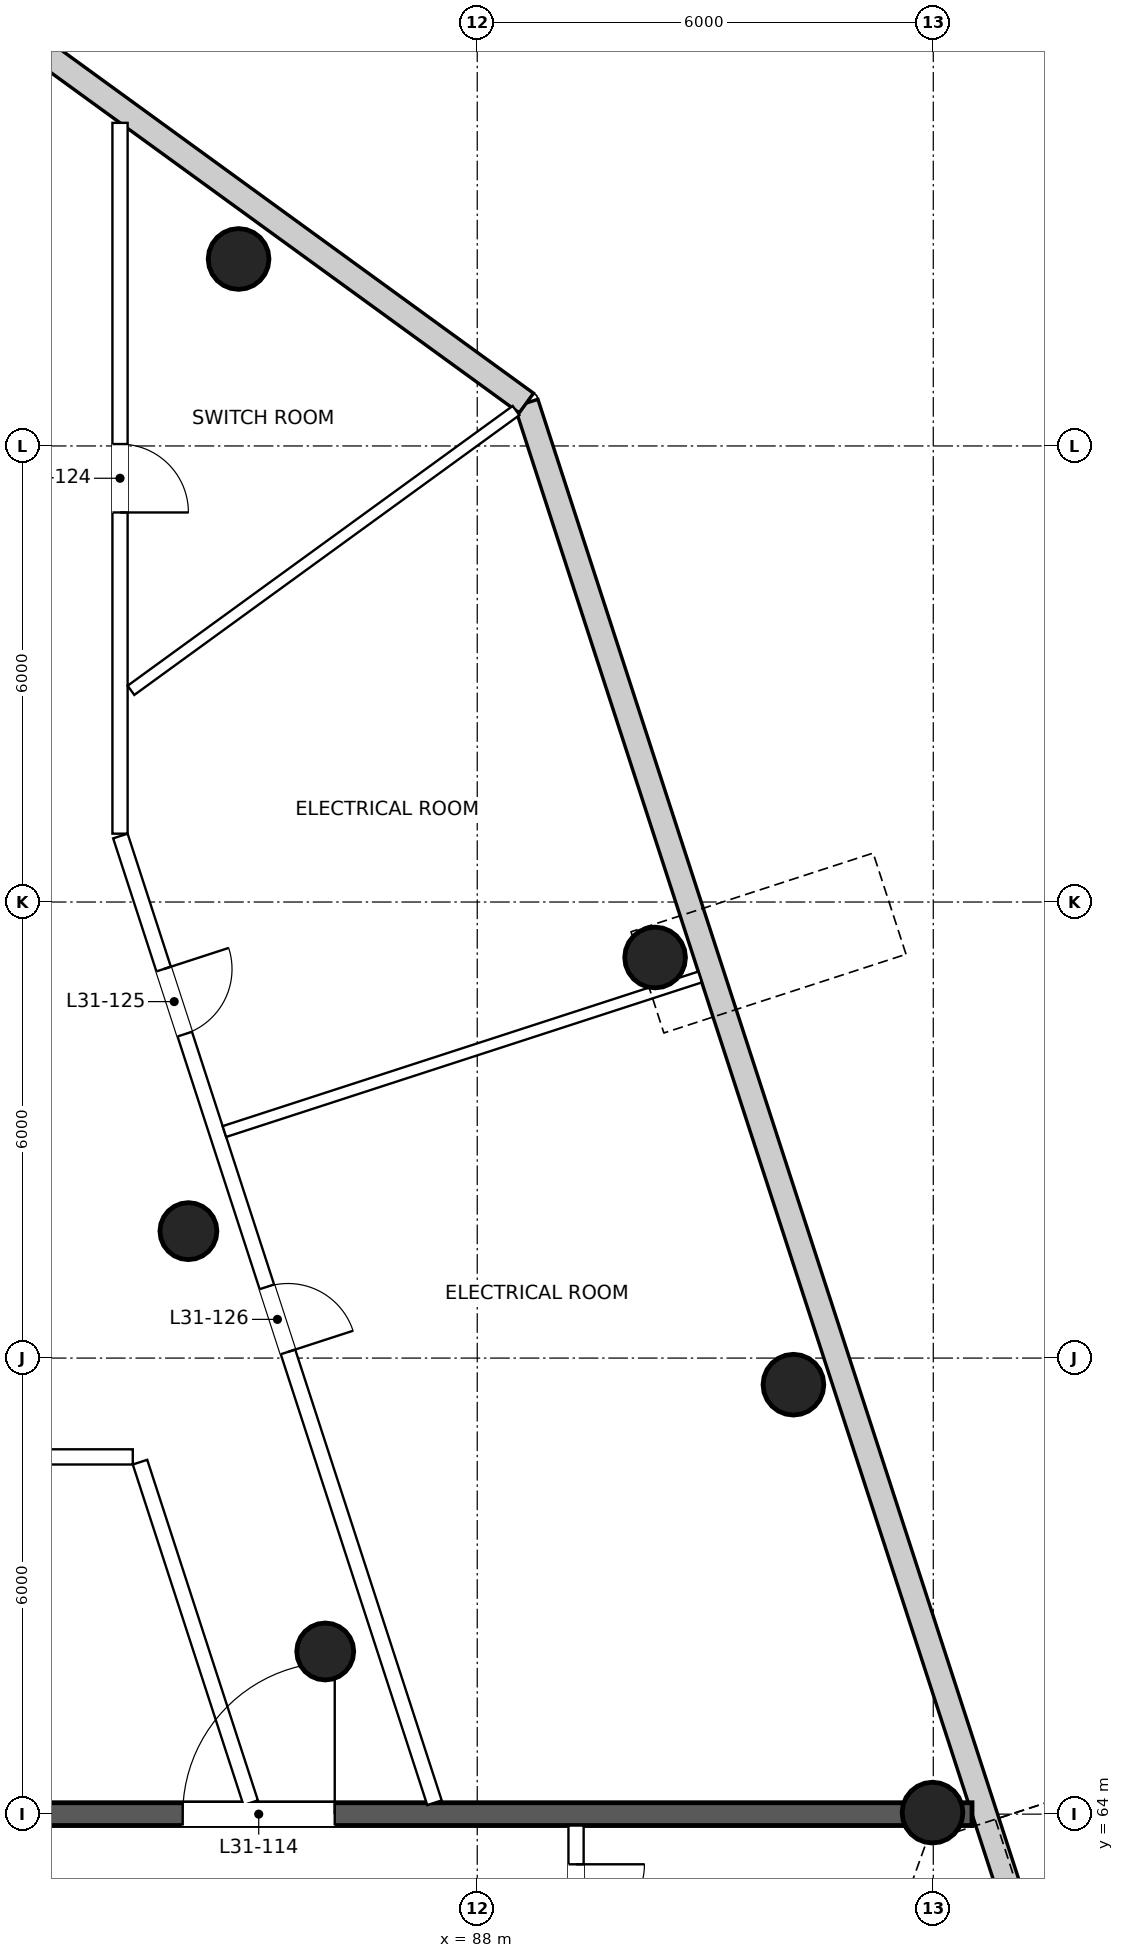
"""IFC4 building model, lengths in metres.
Left out: names, types, materials, properties, quantities, classifications, styles, units other than length and angle.
Written with IfcOpenShell. Run it as: python <this file> out.ifc"""

import sys

from ifc_helpers import new_model, si_unit, direction, frame, frame_2d, origin, origin_2d, place, context, subcontext, project, spatial, rectangle, circle, extrude, element, fill, save


model = new_model("IFC4")
c1 = context("Model", 3, precision=1e-05, world=origin(), true_north=direction((0.0, 1.0)))
c2 = subcontext(c1, "Body", "Model", "MODEL_VIEW")
j1 = project(units=[si_unit("LENGTHUNIT", "METRE"), si_unit("PLANEANGLEUNIT", "RADIAN")], contexts=[c1])
p1 = place(None, origin())
s1 = spatial("IfcSite", under=j1, at=p1, CompositionType="ELEMENT")
p2 = place(p1, origin())
s2 = spatial("IfcBuilding", under=s1, at=p2, CompositionType="ELEMENT")
p3 = place(p2, frame((0.0, 0.0, 137.6)))
s3 = spatial("IfcBuildingStorey", under=s2, at=p3, CompositionType="ELEMENT", Elevation=137.6)
for number, where, z_axis, x_axis in (
    (1, (93.99, 64.02, 0.0), (0.0, 0.0, 1.0), (1.0, 0.0, 0.0)),
    (2, (92.16, 69.65, 0.0), (0.0, 0.0, 1.0), (1.0, 0.0, 0.0)),
    (3, (90.34, 75.27, 0.0), (0.0, 0.0, 1.0), (1.0, 0.0, 0.0)),
    (4, (84.86, 84.46, 0.0), (0.0, 0.0, 1.0), (1.0, 0.0, 0.0)),
):
    element("IfcColumn", number, at=place(p3, frame(where, z_axis=z_axis, x_axis=x_axis)), inside=s3, PredefinedType="COLUMN", context=c2, shape_type="SweptSolid", body=[
        extrude(circle(Radius=0.4, at=origin_2d()), origin(), (0.0, 0.0, 1.0), 5.0),
    ])
for number, where, z_axis, x_axis in (
    (5, (86.0, 66.14, 0.0), (0.0, 0.0, 1.0), (1.0, 0.0, 0.0)),
    (6, (84.2, 71.67, 0.0), (0.0, 0.0, 1.0), (1.0, 0.0, 0.0)),
):
    element("IfcColumn", number, at=place(p3, frame(where, z_axis=z_axis, x_axis=x_axis)), inside=s3, PredefinedType="COLUMN", context=c2, shape_type="SweptSolid", body=[
        extrude(circle(Radius=0.375, at=origin_2d()), origin(), (0.0, 0.0, 1.0), 5.0),
    ])
p4 = place(p3, frame((95.375, 61.855, 0.0), z_axis=(0.0, 0.0, 1.0), x_axis=(-0.309023959084, 0.951054253296, 0.0)))
e7 = element("IfcWall", 7, at=p4, inside=s3, PredefinedType="SOLIDWALL", context=c2, shape_type="SweptSolid", body=[
    extrude(rectangle(XDim=21.775, YDim=0.32, at=frame_2d((10.887, 0.0))), origin(), (0.0, 0.0, 1.0), 4.6),
])
p5 = place(p3, frame((88.646, 82.564, 0.0), z_axis=(0.0, 0.0, 1.0), x_axis=(-0.809005369707, 0.587801251942, 0.0)))
e8 = element("IfcWall", 8, at=p5, inside=s3, PredefinedType="SOLIDWALL", context=c2, shape_type="SweptSolid", body=[
    extrude(rectangle(XDim=8.975, YDim=0.32, at=frame_2d((4.488, 0.0))), origin(), (0.0, 0.0, 1.0), 4.6),
])
p6 = place(p3, frame((45.49, 64.0, 0.0), z_axis=(0.0, 0.0, 1.0), x_axis=(1.0, 0.0, 0.0)))
e9 = element("IfcWall", 9, at=p6, inside=s3, PredefinedType="PARTITIONING", context=c2, shape_type="SweptSolid", body=[
    extrude(rectangle(XDim=49.02, YDim=0.3, at=frame_2d((24.51, 0.0))), origin(), (0.0, 0.0, 1.0), 3.9),
])
p7 = place(p6, frame((8.385, 0.0, 0.0)))
e10 = element("IfcOpeningElement", 10, at=p7, cuts=e9, PredefinedType="OPENING", context=c2, shape_type="SweptSolid", body=[
    extrude(rectangle(XDim=2.0, YDim=2.1, at=frame_2d((1.0, 1.05))), frame((0.0, 0.16, 0.0), z_axis=(0.0, -1.0, 0.0), x_axis=(1.0, 0.0, 0.0)), (0.0, 0.0, 1.0), 0.32),
])
p8 = place(p6, frame((16.535, 0.0, 0.0)))
e11 = element("IfcOpeningElement", 11, at=p8, cuts=e9, PredefinedType="OPENING", context=c2, shape_type="SweptSolid", body=[
    extrude(rectangle(XDim=2.0, YDim=2.1, at=frame_2d((1.0, 1.05))), frame((0.0, 0.16, 0.0), z_axis=(0.0, -1.0, 0.0), x_axis=(1.0, 0.0, 0.0)), (0.0, 0.0, 1.0), 0.32),
])
p9 = place(p6, frame((23.91, 0.0, 0.0)))
e12 = element("IfcOpeningElement", 12, at=p9, cuts=e9, PredefinedType="OPENING", context=c2, shape_type="SweptSolid", body=[
    extrude(rectangle(XDim=1.2, YDim=2.1, at=frame_2d((0.6, 1.05))), frame((0.0, 0.16, 0.0), z_axis=(0.0, -1.0, 0.0), x_axis=(1.0, 0.0, 0.0)), (0.0, 0.0, 1.0), 0.32),
])
p10 = place(p6, frame((30.435, 0.0, 0.0)))
e13 = element("IfcOpeningElement", 13, at=p10, cuts=e9, PredefinedType="OPENING", context=c2, shape_type="SweptSolid", body=[
    extrude(rectangle(XDim=2.0, YDim=2.1, at=frame_2d((1.0, 1.05))), frame((0.0, 0.16, 0.0), z_axis=(0.0, -1.0, 0.0), x_axis=(1.0, 0.0, 0.0)), (0.0, 0.0, 1.0), 0.32),
])
p11 = place(p6, frame((38.635, 0.0, 0.0)))
e14 = element("IfcOpeningElement", 14, at=p11, cuts=e9, PredefinedType="OPENING", context=c2, shape_type="SweptSolid", body=[
    extrude(rectangle(XDim=2.0, YDim=2.1, at=frame_2d((1.0, 1.05))), frame((0.0, 0.16, 0.0), z_axis=(0.0, -1.0, 0.0), x_axis=(1.0, 0.0, 0.0)), (0.0, 0.0, 1.0), 0.32),
])
p12 = place(p3, frame((83.3, 86.251, 0.0), z_axis=(0.0, 0.0, 1.0), x_axis=(0.0, -1.0, 0.0)))
e15 = element("IfcWall", 15, at=p12, inside=s3, PredefinedType="PARTITIONING", context=c2, shape_type="SweptSolid", body=[
    extrude(rectangle(XDim=9.352, YDim=0.2, at=frame_2d((4.676, 0.0))), origin(), (0.0, 0.0, 1.0), 4.15),
])
p13 = place(p12, frame((4.226, 0.0, 0.0)))
e16 = element("IfcOpeningElement", 16, at=p13, cuts=e15, PredefinedType="OPENING", context=c2, shape_type="SweptSolid", body=[
    extrude(rectangle(XDim=0.9, YDim=2.1, at=frame_2d((0.45, 1.05))), frame((0.0, 0.11, 0.0), z_axis=(0.0, -1.0, 0.0), x_axis=(1.0, 0.0, 0.0)), (0.0, 0.0, 1.0), 0.22),
])
p14 = place(p3, frame((83.305, 76.868, 0.0), z_axis=(0.0, 0.0, 1.0), x_axis=(0.309005574406, -0.951060226792, 0.0)))
e17 = element("IfcWall", 17, at=p14, inside=s3, PredefinedType="PARTITIONING", context=c2, shape_type="SweptSolid", body=[
    extrude(rectangle(XDim=13.373, YDim=0.2, at=frame_2d((6.687, 0.0))), origin(), (0.0, 0.0, 1.0), 4.6),
])
p15 = place(p14, frame((1.841, 0.0, 0.0)))
e18 = element("IfcOpeningElement", 18, at=p15, cuts=e17, PredefinedType="OPENING", context=c2, shape_type="SweptSolid", body=[
    extrude(rectangle(XDim=0.9, YDim=2.1, at=frame_2d((0.45, 1.05))), frame((0.0, 0.11, 0.0), z_axis=(0.0, -1.0, 0.0), x_axis=(1.0, 0.0, 0.0)), (0.0, 0.0, 1.0), 0.22),
])
p16 = place(p14, frame((6.236, 0.0, 0.0)))
e19 = element("IfcOpeningElement", 19, at=p16, cuts=e17, PredefinedType="OPENING", context=c2, shape_type="SweptSolid", body=[
    extrude(rectangle(XDim=0.9, YDim=2.1, at=frame_2d((0.45, 1.05))), frame((0.0, 0.11, 0.0), z_axis=(0.0, -1.0, 0.0), x_axis=(1.0, 0.0, 0.0)), (0.0, 0.0, 1.0), 0.22),
])
p17 = place(p3, frame((89.3, 63.85, 0.0), z_axis=(0.0, 0.0, 1.0), x_axis=(0.0, -1.0, 0.0)))
e20 = element("IfcWall", 20, at=p17, inside=s3, PredefinedType="PARTITIONING", context=c2, shape_type="SweptSolid", body=[
    extrude(rectangle(XDim=8.15, YDim=0.2, at=frame_2d((4.075, 0.0))), origin(), (0.0, 0.0, 1.0), 4.15),
])
p18 = place(p17, frame((4.457, 0.0, 0.0)))
e21 = element("IfcOpeningElement", 21, at=p18, cuts=e20, PredefinedType="OPENING", context=c2, shape_type="SweptSolid", body=[
    extrude(rectangle(XDim=0.9, YDim=2.1, at=frame_2d((0.45, 1.05))), frame((0.0, 0.11, 0.0), z_axis=(0.0, -1.0, 0.0), x_axis=(1.0, 0.0, 0.0)), (0.0, 0.0, 1.0), 0.22),
])
p19 = place(p17, frame((0.51, 0.0, 0.0)))
e22 = element("IfcOpeningElement", 22, at=p19, cuts=e20, PredefinedType="OPENING", context=c2, shape_type="SweptSolid", body=[
    extrude(rectangle(XDim=0.9, YDim=2.1, at=frame_2d((0.45, 1.05))), frame((0.0, 0.11, 0.0), z_axis=(0.0, -1.0, 0.0), x_axis=(1.0, 0.0, 0.0)), (0.0, 0.0, 1.0), 0.22),
])
p20 = place(p3, frame((85.019, 64.15, 0.0), z_axis=(0.0, 0.0, 1.0), x_axis=(-0.309036861841, 0.951050060735, 0.0)))
e23 = element("IfcWall", 23, at=p20, inside=s3, PredefinedType="PARTITIONING", context=c2, shape_type="SweptSolid", body=[
    extrude(rectangle(XDim=4.712, YDim=0.2, at=frame_2d((2.356, 0.0))), origin(), (0.0, 0.0, 1.0), 4.6),
])
p21 = place(p3, frame((83.468, 68.7, 0.0), z_axis=(0.0, 0.0, 1.0), x_axis=(-1.0, 0.0, 0.0)))
e24 = element("IfcWall", 24, at=p21, inside=s3, PredefinedType="PARTITIONING", context=c2, shape_type="SweptSolid", body=[
    extrude(rectangle(XDim=12.218, YDim=0.2, at=frame_2d((6.109, 0.0))), origin(), (0.0, 0.0, 1.0), 4.6),
])
p22 = place(p21, frame((8.584, 0.0, 0.0)))
e25 = element("IfcOpeningElement", 25, at=p22, cuts=e24, PredefinedType="OPENING", context=c2, shape_type="SweptSolid", body=[
    extrude(rectangle(XDim=0.9, YDim=2.1, at=frame_2d((0.45, 1.05))), frame((0.0, 0.11, 0.0), z_axis=(0.0, -1.0, 0.0), x_axis=(1.0, 0.0, 0.0)), (0.0, 0.0, 1.0), 0.22),
])
p23 = place(p21, frame((2.444, 0.0, 0.0)))
e26 = element("IfcOpeningElement", 26, at=p23, cuts=e24, PredefinedType="OPENING", context=c2, shape_type="SweptSolid", body=[
    extrude(rectangle(XDim=0.9, YDim=2.1, at=frame_2d((0.45, 1.05))), frame((0.0, 0.11, 0.0), z_axis=(0.0, -1.0, 0.0), x_axis=(1.0, 0.0, 0.0)), (0.0, 0.0, 1.0), 0.22),
])
p24 = place(p3, frame((88.51, 82.466, 0.0), z_axis=(0.0, 0.0, 1.0), x_axis=(-0.809012497549, -0.587791441593, 0.0)))
e27 = element("IfcWall", 27, at=p24, inside=s3, PredefinedType="PARTITIONING", context=c2, shape_type="SweptSolid", body=[
    extrude(rectangle(XDim=6.262, YDim=0.15, at=frame_2d((3.131, 0.0))), origin(), (0.0, 0.0, 1.0), 3.9),
])
p25 = place(p3, frame((90.931, 75.014, 0.0), z_axis=(0.0, 0.0, 1.0), x_axis=(-0.95105288048, -0.309028184041, 0.0)))
e28 = element("IfcWall", 28, at=p25, inside=s3, PredefinedType="PARTITIONING", context=c2, shape_type="SweptSolid", body=[
    extrude(rectangle(XDim=6.58, YDim=0.15, at=frame_2d((3.29, 0.0))), origin(), (0.0, 0.0, 1.0), 3.6),
])
p26 = place(p11, origin())
e29 = element("IfcDoor", 29, at=p26, inside=s3, OperationType="DOUBLE_DOOR_SINGLE_SWING", PredefinedType="DOOR", context=c2, shape_type="SweptSolid", body=[
    extrude(rectangle(XDim=2.0, YDim=2.1, at=frame_2d((1.0, 1.05))), frame((0.0, 0.025, 0.0), z_axis=(0.0, -1.0, 0.0), x_axis=(1.0, 0.0, 0.0)), (0.0, 0.0, 1.0), 0.05),
])
fill(e14, e29)
p27 = place(p13, origin())
e30 = element("IfcDoor", 30, at=p27, inside=s3, OperationType="SINGLE_SWING_RIGHT", PredefinedType="DOOR", context=c2, shape_type="SweptSolid", body=[
    extrude(rectangle(XDim=0.9, YDim=2.1, at=frame_2d((0.45, 1.05))), frame((0.0, 0.025, 0.0), z_axis=(0.0, -1.0, 0.0), x_axis=(1.0, 0.0, 0.0)), (0.0, 0.0, 1.0), 0.05),
])
fill(e16, e30)
p28 = place(p15, origin())
e31 = element("IfcDoor", 31, at=p28, inside=s3, OperationType="SINGLE_SWING_LEFT", PredefinedType="DOOR", context=c2, shape_type="SweptSolid", body=[
    extrude(rectangle(XDim=0.9, YDim=2.1, at=frame_2d((0.45, 1.05))), frame((0.0, 0.025, 0.0), z_axis=(0.0, -1.0, 0.0), x_axis=(1.0, 0.0, 0.0)), (0.0, 0.0, 1.0), 0.05),
])
fill(e18, e31)
p29 = place(p16, origin())
e32 = element("IfcDoor", 32, at=p29, inside=s3, OperationType="SINGLE_SWING_RIGHT", PredefinedType="DOOR", context=c2, shape_type="SweptSolid", body=[
    extrude(rectangle(XDim=0.9, YDim=2.1, at=frame_2d((0.45, 1.05))), frame((0.0, 0.025, 0.0), z_axis=(0.0, -1.0, 0.0), x_axis=(1.0, 0.0, 0.0)), (0.0, 0.0, 1.0), 0.05),
])
fill(e19, e32)
p30 = place(p19, origin())
e33 = element("IfcDoor", 33, at=p30, inside=s3, OperationType="SINGLE_SWING_LEFT", PredefinedType="DOOR", context=c2, shape_type="SweptSolid", body=[
    extrude(rectangle(XDim=0.9, YDim=2.1, at=frame_2d((0.45, 1.05))), frame((0.0, 0.025, 0.0), z_axis=(0.0, -1.0, 0.0), x_axis=(1.0, 0.0, 0.0)), (0.0, 0.0, 1.0), 0.05),
])
fill(e22, e33)
save(model, sys.argv[1])
